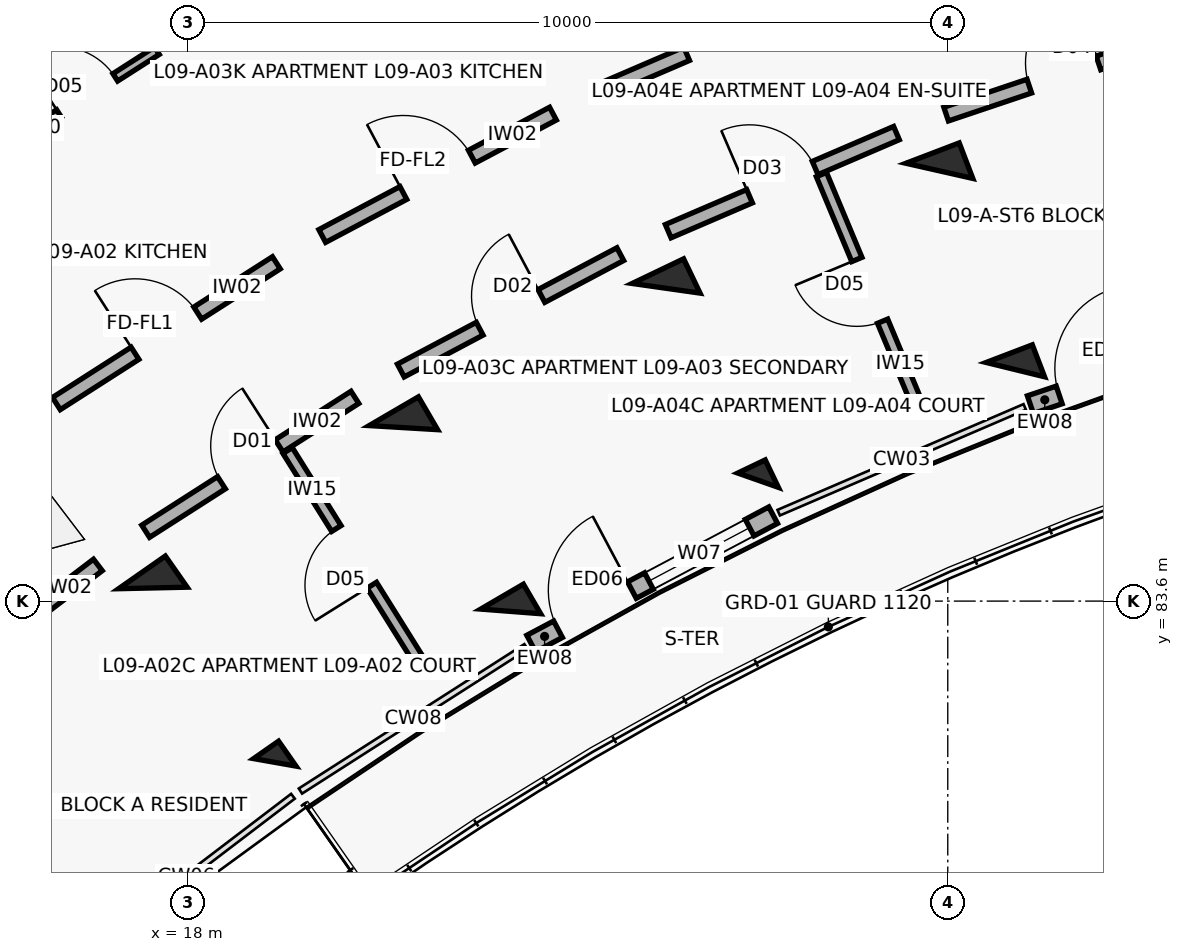
"""IFC4 building model, lengths in metres.
Left out: names, types, materials, properties, quantities, classifications, styles, units other than length and angle.
Written with IfcOpenShell. Run it as: python <this file> out.ifc"""

import sys

from ifc_helpers import new_model, si_unit, direction, frame, frame_2d, origin, origin_2d, place, context, subcontext, project, spatial, rectangle, extrude, element, fill, save


model = new_model("IFC4")
c1 = context("Model", 3, precision=1e-05, world=origin(), true_north=direction((0.0, 1.0)))
c2 = subcontext(c1, "Body", "Model", "MODEL_VIEW")
j1 = project(units=[si_unit("LENGTHUNIT", "METRE"), si_unit("PLANEANGLEUNIT", "RADIAN")], contexts=[c1])
p1 = place(None, origin())
s1 = spatial("IfcSite", under=j1, at=p1, CompositionType="ELEMENT")
p2 = place(p1, origin())
s2 = spatial("IfcBuilding", under=s1, at=p2, CompositionType="ELEMENT")
p3 = place(p2, frame((0.0, 0.0, 29.8)))
s3 = spatial("IfcBuildingStorey", under=s2, at=p3, CompositionType="ELEMENT", Elevation=29.8)
p4 = place(p3, frame((19.146, 81.478, 0.0), z_axis=(0.0, 0.0, 1.0), x_axis=(-0.573004420611, 0.819552276527, 0.0)))
e1 = element("IfcColumn", 1, at=p4, inside=s3, PredefinedType="COLUMN", context=c2, shape_type="SweptSolid", body=[
    extrude(rectangle(XDim=0.4, YDim=0.4, at=origin_2d()), origin(), (0.0, 0.0, 1.0), 3.1),
])
p5 = place(p3, frame((17.542, 83.773, 0.0), z_axis=(0.0, 0.0, 1.0), x_axis=(-0.573004420611, 0.819552276527, 0.0)))
e2 = element("IfcColumn", 2, at=p5, inside=s3, PredefinedType="COLUMN", context=c2, shape_type="SweptSolid", body=[
    extrude(rectangle(XDim=0.5, YDim=0.75, at=origin_2d()), origin(), (0.0, 0.0, 1.0), 3.1),
])
p6 = place(p3, frame((22.249, 83.464, 0.0), z_axis=(0.0, 0.0, 1.0), x_axis=(-0.504226211181, 0.863571611366, 0.0)))
e3 = element("IfcColumn", 3, at=p6, inside=s3, PredefinedType="COLUMN", context=c2, shape_type="SweptSolid", body=[
    extrude(rectangle(XDim=0.45, YDim=0.65, at=origin_2d()), origin(), (0.0, 0.0, 1.0), 3.1),
])
for number, where, z_axis, x_axis in (
    (4, (20.837, 85.882, 0.0), (0.0, 0.0, 1.0), (-0.504, 0.864, 0.0)),
    (5, (17.873, 90.96, 0.0), (0.0, 0.0, 1.0), (-0.504, 0.864, 0.0)),
):
    element("IfcColumn", number, at=place(p3, frame(where, z_axis=z_axis, x_axis=x_axis)), inside=s3, PredefinedType="COLUMN", context=c2, shape_type="SweptSolid", body=[
        extrude(rectangle(XDim=0.5, YDim=0.75, at=origin_2d()), origin(), (0.0, 0.0, 1.0), 3.1),
    ])
p7 = place(p3, frame((25.504, 85.191, 0.0), z_axis=(0.0, 0.0, 1.0), x_axis=(-0.432085748802, 0.901832526405, 0.0)))
e6 = element("IfcColumn", 6, at=p7, inside=s3, PredefinedType="COLUMN", context=c2, shape_type="SweptSolid", body=[
    extrude(rectangle(XDim=0.4, YDim=0.4, at=origin_2d()), origin(), (0.0, 0.0, 1.0), 3.1),
])
p8 = place(p3, frame((24.294, 87.716, 0.0), z_axis=(0.0, 0.0, 1.0), x_axis=(-0.432085748802, 0.901832526405, 0.0)))
e7 = element("IfcColumn", 7, at=p8, inside=s3, PredefinedType="COLUMN", context=c2, shape_type="SweptSolid", body=[
    extrude(rectangle(XDim=0.5, YDim=0.75, at=origin_2d()), origin(), (0.0, 0.0, 1.0), 3.1),
])
p9 = place(p3, frame((28.889, 86.646, 0.0), z_axis=(0.0, 0.0, 1.0), x_axis=(-0.357064076459, 0.934079892355, 0.0)))
e8 = element("IfcColumn", 8, at=p9, inside=s3, PredefinedType="COLUMN", context=c2, shape_type="SweptSolid", body=[
    extrude(rectangle(XDim=0.45, YDim=0.65, at=origin_2d()), origin(), (0.0, 0.0, 1.0), 3.1),
])
p10 = place(p3, frame((27.889, 89.261, 0.0), z_axis=(0.0, 0.0, 1.0), x_axis=(-0.357064076459, 0.934079892355, 0.0)))
e9 = element("IfcColumn", 9, at=p10, inside=s3, PredefinedType="COLUMN", context=c2, shape_type="SweptSolid", body=[
    extrude(rectangle(XDim=0.5, YDim=0.75, at=origin_2d()), origin(), (0.0, 0.0, 1.0), 3.1),
])
p11 = place(p3, frame((22.519, 83.042, 0.0), z_axis=(0.0, 0.0, 1.0), x_axis=(0.883438308286, 0.468547495407, 0.0)))
e10 = element("IfcWall", 10, at=p11, inside=s3, PredefinedType="SOLIDWALL", context=c2, shape_type="SweptSolid", body=[
    extrude(rectangle(XDim=3.604, YDim=0.245, at=frame_2d((1.802, 0.0))), origin(), (0.0, 0.0, 1.0), 2.25),
])
p12 = place(p11, frame((0.4, 0.0, 0.0)))
e11 = element("IfcOpeningElement", 11, at=p12, cuts=e10, PredefinedType="OPENING", context=c2, shape_type="SweptSolid", body=[
    extrude(rectangle(XDim=1.1, YDim=2.15, at=frame_2d((0.55, 1.075))), frame((0.0, 0.133, 0.0), z_axis=(0.0, -1.0, 0.0), x_axis=(1.0, 0.0, 0.0)), (0.0, 0.0, 1.0), 0.265),
])
p13 = place(p11, frame((1.754, 0.0, 0.35)))
e12 = element("IfcOpeningElement", 12, at=p13, cuts=e10, PredefinedType="OPENING", context=c2, shape_type="SweptSolid", body=[
    extrude(rectangle(XDim=1.5, YDim=1.65, at=frame_2d((0.75, 0.825))), frame((0.0, 0.133, 0.0), z_axis=(0.0, -1.0, 0.0), x_axis=(1.0, 0.0, 0.0)), (0.0, 0.0, 1.0), 0.265),
])
p14 = place(p3, frame((29.087, 86.185, 0.0), z_axis=(0.0, 0.0, 1.0), x_axis=(0.947880824442, 0.318625081649, 0.0)))
e13 = element("IfcWall", 13, at=p14, inside=s3, PredefinedType="SOLIDWALL", context=c2, shape_type="SweptSolid", body=[
    extrude(rectangle(XDim=3.604, YDim=0.245, at=frame_2d((1.802, 0.0))), origin(), (0.0, 0.0, 1.0), 2.25),
])
p15 = place(p14, frame((0.4, 0.0, 0.0)))
e14 = element("IfcOpeningElement", 14, at=p15, cuts=e13, PredefinedType="OPENING", context=c2, shape_type="SweptSolid", body=[
    extrude(rectangle(XDim=1.1, YDim=2.15, at=frame_2d((0.55, 1.075))), frame((0.0, 0.133, 0.0), z_axis=(0.0, -1.0, 0.0), x_axis=(1.0, 0.0, 0.0)), (0.0, 0.0, 1.0), 0.265),
])
p16 = place(p14, frame((1.754, 0.0, 0.35)))
e15 = element("IfcOpeningElement", 15, at=p16, cuts=e13, PredefinedType="OPENING", context=c2, shape_type="SweptSolid", body=[
    extrude(rectangle(XDim=1.5, YDim=1.65, at=frame_2d((0.75, 0.825))), frame((0.0, 0.133, 0.0), z_axis=(0.0, -1.0, 0.0), x_axis=(1.0, 0.0, 0.0)), (0.0, 0.0, 1.0), 0.265),
])
p17 = place(p3, frame((14.329, 82.18, 0.0), z_axis=(0.0, 0.0, 1.0), x_axis=(0.795501577908, 0.605951515838, 0.0)))
e16 = element("IfcWall", 16, at=p17, inside=s3, PredefinedType="SOLIDWALL", context=c2, shape_type="SweptSolid", body=[
    extrude(rectangle(XDim=3.129, YDim=0.19, at=frame_2d((1.564, 0.0))), origin(), (0.0, 0.0, 1.0), 2.08),
])
p18 = place(p17, frame((1.004, 0.0, 0.0)))
e17 = element("IfcOpeningElement", 17, at=p18, cuts=e16, PredefinedType="OPENING", context=c2, shape_type="SweptSolid", body=[
    extrude(rectangle(XDim=1.12, YDim=2.15, at=frame_2d((0.56, 1.075))), frame((0.0, 0.105, 0.0), z_axis=(0.0, -1.0, 0.0), x_axis=(1.0, 0.0, 0.0)), (0.0, 0.0, 1.0), 0.21),
])
p19 = place(p3, frame((16.272, 86.199, 0.0), z_axis=(0.0, 0.0, 1.0), x_axis=(0.842257205985, 0.539075874963, 0.0)))
e18 = element("IfcWall", 18, at=p19, inside=s3, PredefinedType="SOLIDWALL", context=c2, shape_type="SweptSolid", body=[
    extrude(rectangle(XDim=3.436, YDim=0.19, at=frame_2d((1.718, 0.0))), origin(), (0.0, 0.0, 1.0), 2.08),
])
p20 = place(p19, frame((1.228, 0.0, 0.0)))
e19 = element("IfcOpeningElement", 19, at=p20, cuts=e18, PredefinedType="OPENING", context=c2, shape_type="SweptSolid", body=[
    extrude(rectangle(XDim=0.98, YDim=2.15, at=frame_2d((0.49, 1.075))), frame((0.0, 0.105, 0.0), z_axis=(0.0, -1.0, 0.0), x_axis=(1.0, 0.0, 0.0)), (0.0, 0.0, 1.0), 0.21),
])
p21 = place(p3, frame((17.447, 84.519, 0.0), z_axis=(0.0, 0.0, 1.0), x_axis=(0.842225276846, 0.539125758095, 0.0)))
e20 = element("IfcWall", 20, at=p21, inside=s3, PredefinedType="SOLIDWALL", context=c2, shape_type="SweptSolid", body=[
    extrude(rectangle(XDim=3.269, YDim=0.19, at=frame_2d((1.634, 0.0))), origin(), (0.0, 0.0, 1.0), 2.08),
])
p22 = place(p21, frame((1.184, 0.0, 0.0)))
e21 = element("IfcOpeningElement", 21, at=p22, cuts=e20, PredefinedType="OPENING", context=c2, shape_type="SweptSolid", body=[
    extrude(rectangle(XDim=0.9, YDim=2.1, at=frame_2d((0.45, 1.05))), frame((0.0, 0.105, 0.0), z_axis=(0.0, -1.0, 0.0), x_axis=(1.0, 0.0, 0.0)), (0.0, 0.0, 1.0), 0.21),
])
p23 = place(p3, frame((21.064, 82.783, 0.0), z_axis=(0.0, 0.0, 1.0), x_axis=(-0.53015188203, 0.847902696057, 0.0)))
e22 = element("IfcWall", 22, at=p23, inside=s3, PredefinedType="PARTITIONING", context=c2, shape_type="SweptSolid", body=[
    extrude(rectangle(XDim=3.3, YDim=0.145, at=frame_2d((1.65, 0.0))), origin(), (0.0, 0.0, 1.0), 2.08),
])
p24 = place(p23, frame((1.21, 0.0, 0.0)))
e23 = element("IfcOpeningElement", 23, at=p24, cuts=e22, PredefinedType="OPENING", context=c2, shape_type="SweptSolid", body=[
    extrude(rectangle(XDim=0.88, YDim=2.1, at=frame_2d((0.44, 1.05))), frame((0.0, 0.083, 0.0), z_axis=(0.0, -1.0, 0.0), x_axis=(1.0, 0.0, 0.0)), (0.0, 0.0, 1.0), 0.165),
])
p25 = place(p3, frame((14.396, 88.795, 0.0), z_axis=(0.0, 0.0, 1.0), x_axis=(0.842271400662, 0.539053696423, 0.0)))
e24 = element("IfcWall", 24, at=p25, inside=s3, PredefinedType="PARTITIONING", context=c2, shape_type="SweptSolid", body=[
    extrude(rectangle(XDim=3.797, YDim=0.115, at=frame_2d((1.898, 0.0))), origin(), (0.0, 0.0, 1.0), 2.08),
])
p26 = place(p25, frame((0.65, 0.0, 0.0)))
e25 = element("IfcOpeningElement", 25, at=p26, cuts=e24, PredefinedType="OPENING", context=c2, shape_type="SweptSolid", body=[
    extrude(rectangle(XDim=0.9, YDim=2.1, at=frame_2d((0.45, 1.05))), frame((0.0, 0.067, 0.0), z_axis=(0.0, -1.0, 0.0), x_axis=(1.0, 0.0, 0.0)), (0.0, 0.0, 1.0), 0.135),
])
p27 = place(p25, frame((2.267, 0.0, 0.0)))
e26 = element("IfcOpeningElement", 26, at=p27, cuts=e24, PredefinedType="OPENING", context=c2, shape_type="SweptSolid", body=[
    extrude(rectangle(XDim=0.88, YDim=2.1, at=frame_2d((0.44, 1.05))), frame((0.0, 0.067, 0.0), z_axis=(0.0, -1.0, 0.0), x_axis=(1.0, 0.0, 0.0)), (0.0, 0.0, 1.0), 0.135),
])
p28 = place(p3, frame((19.77, 88.404, 0.0), z_axis=(0.0, 0.0, 1.0), x_axis=(0.883410853063, 0.468599258099, 0.0)))
e27 = element("IfcWall", 27, at=p28, inside=s3, PredefinedType="SOLIDWALL", context=c2, shape_type="SweptSolid", body=[
    extrude(rectangle(XDim=3.436, YDim=0.19, at=frame_2d((1.718, 0.0))), origin(), (0.0, 0.0, 1.0), 2.08),
])
p29 = place(p28, frame((1.208, 0.0, 0.0)))
e28 = element("IfcOpeningElement", 28, at=p29, cuts=e27, PredefinedType="OPENING", context=c2, shape_type="SweptSolid", body=[
    extrude(rectangle(XDim=1.02, YDim=2.15, at=frame_2d((0.51, 1.075))), frame((0.0, 0.105, 0.0), z_axis=(0.0, -1.0, 0.0), x_axis=(1.0, 0.0, 0.0)), (0.0, 0.0, 1.0), 0.21),
])
p30 = place(p3, frame((20.804, 86.634, 0.0), z_axis=(0.0, 0.0, 1.0), x_axis=(0.883444301944, 0.468536194293, 0.0)))
e29 = element("IfcWall", 29, at=p30, inside=s3, PredefinedType="SOLIDWALL", context=c2, shape_type="SweptSolid", body=[
    extrude(rectangle(XDim=3.269, YDim=0.19, at=frame_2d((1.634, 0.0))), origin(), (0.0, 0.0, 1.0), 2.08),
])
p31 = place(p30, frame((1.174, 0.0, 0.0)))
e30 = element("IfcOpeningElement", 30, at=p31, cuts=e29, PredefinedType="OPENING", context=c2, shape_type="SweptSolid", body=[
    extrude(rectangle(XDim=0.92, YDim=2.1, at=frame_2d((0.46, 1.05))), frame((0.0, 0.105, 0.0), z_axis=(0.0, -1.0, 0.0), x_axis=(1.0, 0.0, 0.0)), (0.0, 0.0, 1.0), 0.21),
])
p32 = place(p3, frame((23.437, 90.316, 0.0), z_axis=(0.0, 0.0, 1.0), x_axis=(0.918718172399, 0.394913813008, 0.0)))
e31 = element("IfcWall", 31, at=p32, inside=s3, PredefinedType="SOLIDWALL", context=c2, shape_type="SweptSolid", body=[
    extrude(rectangle(XDim=3.436, YDim=0.19, at=frame_2d((1.718, 0.0))), origin(), (0.0, 0.0, 1.0), 2.08),
])
p33 = place(p32, frame((1.228, 0.0, 0.0)))
e32 = element("IfcOpeningElement", 32, at=p33, cuts=e31, PredefinedType="OPENING", context=c2, shape_type="SweptSolid", body=[
    extrude(rectangle(XDim=0.98, YDim=2.15, at=frame_2d((0.49, 1.075))), frame((0.0, 0.105, 0.0), z_axis=(0.0, -1.0, 0.0), x_axis=(1.0, 0.0, 0.0)), (0.0, 0.0, 1.0), 0.21),
])
p34 = place(p3, frame((24.322, 88.467, 0.0), z_axis=(0.0, 0.0, 1.0), x_axis=(0.918723391052, 0.394901672235, 0.0)))
e33 = element("IfcWall", 33, at=p34, inside=s3, PredefinedType="SOLIDWALL", context=c2, shape_type="SweptSolid", body=[
    extrude(rectangle(XDim=3.269, YDim=0.19, at=frame_2d((1.634, 0.0))), origin(), (0.0, 0.0, 1.0), 2.08),
])
p35 = place(p34, frame((1.164, 0.0, 0.0)))
e34 = element("IfcOpeningElement", 34, at=p35, cuts=e33, PredefinedType="OPENING", context=c2, shape_type="SweptSolid", body=[
    extrude(rectangle(XDim=0.94, YDim=2.1, at=frame_2d((0.47, 1.05))), frame((0.0, 0.105, 0.0), z_axis=(0.0, -1.0, 0.0), x_axis=(1.0, 0.0, 0.0)), (0.0, 0.0, 1.0), 0.21),
])
p36 = place(p3, frame((27.609, 86.166, 0.0), z_axis=(0.0, 0.0, 1.0), x_axis=(-0.385151143297, 0.922853507777, 0.0)))
e35 = element("IfcWall", 35, at=p36, inside=s3, PredefinedType="PARTITIONING", context=c2, shape_type="SweptSolid", body=[
    extrude(rectangle(XDim=3.3, YDim=0.145, at=frame_2d((1.65, 0.0))), origin(), (0.0, 0.0, 1.0), 2.08),
])
p37 = place(p36, frame((1.21, 0.0, 0.0)))
e36 = element("IfcOpeningElement", 36, at=p37, cuts=e35, PredefinedType="OPENING", context=c2, shape_type="SweptSolid", body=[
    extrude(rectangle(XDim=0.88, YDim=2.1, at=frame_2d((0.44, 1.05))), frame((0.0, 0.083, 0.0), z_axis=(0.0, -1.0, 0.0), x_axis=(1.0, 0.0, 0.0)), (0.0, 0.0, 1.0), 0.165),
])
p38 = place(p3, frame((27.979, 90.008, 0.0), z_axis=(0.0, 0.0, 1.0), x_axis=(0.94787351033, 0.318646839643, 0.0)))
e37 = element("IfcWall", 37, at=p38, inside=s3, PredefinedType="SOLIDWALL", context=c2, shape_type="SweptSolid", body=[
    extrude(rectangle(XDim=3.269, YDim=0.19, at=frame_2d((1.634, 0.0))), origin(), (0.0, 0.0, 1.0), 2.08),
])
p39 = place(p38, frame((1.154, 0.0, 0.0)))
e38 = element("IfcOpeningElement", 38, at=p39, cuts=e37, PredefinedType="OPENING", context=c2, shape_type="SweptSolid", body=[
    extrude(rectangle(XDim=0.96, YDim=2.1, at=frame_2d((0.48, 1.05))), frame((0.0, 0.105, 0.0), z_axis=(0.0, -1.0, 0.0), x_axis=(1.0, 0.0, 0.0)), (0.0, 0.0, 1.0), 0.21),
])
p40 = place(p12, origin())
e39 = element("IfcDoor", 39, at=p40, inside=s3, OperationType="SINGLE_SWING_RIGHT", PredefinedType="DOOR", context=c2, shape_type="SweptSolid", body=[
    extrude(rectangle(XDim=1.1, YDim=2.15, at=frame_2d((0.55, 1.075))), frame((0.0, 0.025, 0.0), z_axis=(0.0, -1.0, 0.0), x_axis=(1.0, 0.0, 0.0)), (0.0, 0.0, 1.0), 0.05),
])
fill(e11, e39)
p41 = place(p13, origin())
e40 = element("IfcWindow", 40, at=p41, inside=s3, PartitioningType="DOUBLE_PANEL_VERTICAL", PredefinedType="WINDOW", context=c2, shape_type="SweptSolid", body=[
    extrude(rectangle(XDim=1.5, YDim=1.65, at=frame_2d((0.75, 0.825))), frame((0.0, 0.03, 0.0), z_axis=(0.0, -1.0, 0.0), x_axis=(1.0, 0.0, 0.0)), (0.0, 0.0, 1.0), 0.06),
])
fill(e12, e40)
p42 = place(p15, origin())
e41 = element("IfcDoor", 41, at=p42, inside=s3, OperationType="SINGLE_SWING_RIGHT", PredefinedType="DOOR", context=c2, shape_type="SweptSolid", body=[
    extrude(rectangle(XDim=1.1, YDim=2.15, at=frame_2d((0.55, 1.075))), frame((0.0, 0.025, 0.0), z_axis=(0.0, -1.0, 0.0), x_axis=(1.0, 0.0, 0.0)), (0.0, 0.0, 1.0), 0.05),
])
fill(e14, e41)
p43 = place(p20, origin())
e42 = element("IfcDoor", 42, at=p43, inside=s3, OperationType="SINGLE_SWING_LEFT", PredefinedType="DOOR", context=c2, shape_type="SweptSolid", body=[
    extrude(rectangle(XDim=0.98, YDim=2.15, at=frame_2d((0.49, 1.075))), frame((0.0, 0.025, 0.0), z_axis=(0.0, -1.0, 0.0), x_axis=(1.0, 0.0, 0.0)), (0.0, 0.0, 1.0), 0.05),
])
fill(e19, e42)
p44 = place(p22, origin())
e43 = element("IfcDoor", 43, at=p44, inside=s3, OperationType="SINGLE_SWING_RIGHT", PredefinedType="DOOR", context=c2, shape_type="SweptSolid", body=[
    extrude(rectangle(XDim=0.9, YDim=2.1, at=frame_2d((0.45, 1.05))), frame((0.0, 0.025, 0.0), z_axis=(0.0, -1.0, 0.0), x_axis=(1.0, 0.0, 0.0)), (0.0, 0.0, 1.0), 0.05),
])
fill(e21, e43)
p45 = place(p24, origin())
e44 = element("IfcDoor", 44, at=p45, inside=s3, OperationType="SINGLE_SWING_LEFT", PredefinedType="DOOR", context=c2, shape_type="SweptSolid", body=[
    extrude(rectangle(XDim=0.88, YDim=2.1, at=frame_2d((0.44, 1.05))), frame((0.0, 0.025, 0.0), z_axis=(0.0, -1.0, 0.0), x_axis=(1.0, 0.0, 0.0)), (0.0, 0.0, 1.0), 0.05),
])
fill(e23, e44)
p46 = place(p27, origin())
e45 = element("IfcDoor", 45, at=p46, inside=s3, OperationType="SINGLE_SWING_LEFT", PredefinedType="DOOR", context=c2, shape_type="SweptSolid", body=[
    extrude(rectangle(XDim=0.88, YDim=2.1, at=frame_2d((0.44, 1.05))), frame((0.0, 0.025, 0.0), z_axis=(0.0, -1.0, 0.0), x_axis=(1.0, 0.0, 0.0)), (0.0, 0.0, 1.0), 0.05),
])
fill(e26, e45)
p47 = place(p29, origin())
e46 = element("IfcDoor", 46, at=p47, inside=s3, OperationType="SINGLE_SWING_LEFT", PredefinedType="DOOR", context=c2, shape_type="SweptSolid", body=[
    extrude(rectangle(XDim=1.02, YDim=2.15, at=frame_2d((0.51, 1.075))), frame((0.0, 0.025, 0.0), z_axis=(0.0, -1.0, 0.0), x_axis=(1.0, 0.0, 0.0)), (0.0, 0.0, 1.0), 0.05),
])
fill(e28, e46)
p48 = place(p31, origin())
e47 = element("IfcDoor", 47, at=p48, inside=s3, OperationType="SINGLE_SWING_RIGHT", PredefinedType="DOOR", context=c2, shape_type="SweptSolid", body=[
    extrude(rectangle(XDim=0.92, YDim=2.1, at=frame_2d((0.46, 1.05))), frame((0.0, 0.025, 0.0), z_axis=(0.0, -1.0, 0.0), x_axis=(1.0, 0.0, 0.0)), (0.0, 0.0, 1.0), 0.05),
])
fill(e30, e47)
p49 = place(p33, origin())
e48 = element("IfcDoor", 48, at=p49, inside=s3, OperationType="SINGLE_SWING_RIGHT", PredefinedType="DOOR", context=c2, shape_type="SweptSolid", body=[
    extrude(rectangle(XDim=0.98, YDim=2.15, at=frame_2d((0.49, 1.075))), frame((0.0, 0.025, 0.0), z_axis=(0.0, -1.0, 0.0), x_axis=(1.0, 0.0, 0.0)), (0.0, 0.0, 1.0), 0.05),
])
fill(e32, e48)
p50 = place(p35, origin())
e49 = element("IfcDoor", 49, at=p50, inside=s3, OperationType="SINGLE_SWING_LEFT", PredefinedType="DOOR", context=c2, shape_type="SweptSolid", body=[
    extrude(rectangle(XDim=0.94, YDim=2.1, at=frame_2d((0.47, 1.05))), frame((0.0, 0.025, 0.0), z_axis=(0.0, -1.0, 0.0), x_axis=(1.0, 0.0, 0.0)), (0.0, 0.0, 1.0), 0.05),
])
fill(e34, e49)
p51 = place(p37, origin())
e50 = element("IfcDoor", 50, at=p51, inside=s3, OperationType="SINGLE_SWING_RIGHT", PredefinedType="DOOR", context=c2, shape_type="SweptSolid", body=[
    extrude(rectangle(XDim=0.88, YDim=2.1, at=frame_2d((0.44, 1.05))), frame((0.0, 0.025, 0.0), z_axis=(0.0, -1.0, 0.0), x_axis=(1.0, 0.0, 0.0)), (0.0, 0.0, 1.0), 0.05),
])
fill(e36, e50)
p52 = place(p39, origin())
e51 = element("IfcDoor", 51, at=p52, inside=s3, OperationType="SINGLE_SWING_RIGHT", PredefinedType="DOOR", context=c2, shape_type="SweptSolid", body=[
    extrude(rectangle(XDim=0.96, YDim=2.1, at=frame_2d((0.48, 1.05))), frame((0.0, 0.025, 0.0), z_axis=(0.0, -1.0, 0.0), x_axis=(1.0, 0.0, 0.0)), (0.0, 0.0, 1.0), 0.05),
])
fill(e38, e51)
save(model, sys.argv[1])
